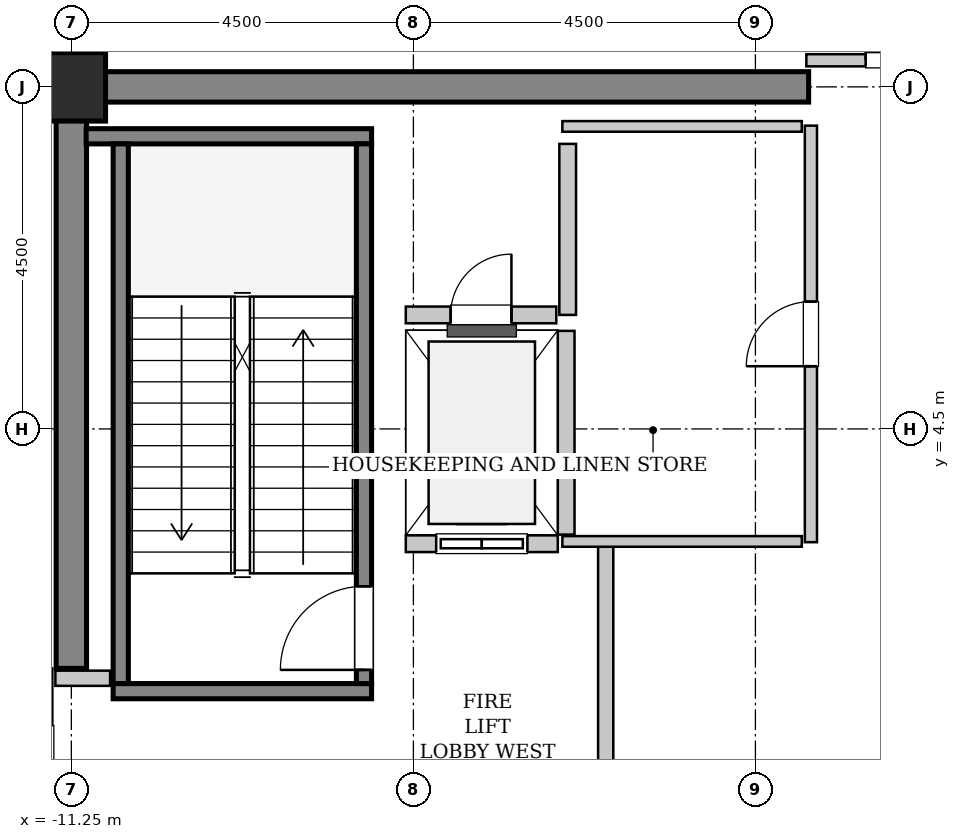
"""IFC4 building model, lengths in metres.
Left out: names, types, materials, properties, quantities, classifications, styles, units other than length and angle.
Written with IfcOpenShell. Run it as: python <this file> out.ifc"""

import sys

from ifc_helpers import new_model, si_unit, direction, frame, frame_2d, origin, origin_2d, place, context, subcontext, project, spatial, rectangle, extrude, source, transform, mapped, element, fill, save


model = new_model("IFC4")
c1 = context("Model", 3, precision=1e-05, world=origin(), true_north=direction((0.0, 1.0)))
c2 = subcontext(c1, "Body", "Model", "MODEL_VIEW")
j1 = project(units=[si_unit("LENGTHUNIT", "METRE"), si_unit("PLANEANGLEUNIT", "RADIAN")], contexts=[c1])
p1 = place(None, origin())
s1 = spatial("IfcSite", under=j1, at=p1, CompositionType="ELEMENT")
p2 = place(p1, origin())
s2 = spatial("IfcBuilding", under=s1, at=p2, CompositionType="ELEMENT")
p3 = place(p2, frame((0.0, 0.0, 353.8)))
s3 = spatial("IfcBuildingStorey", under=s2, at=p3, CompositionType="ELEMENT", Elevation=353.8)
m1 = source(origin(), c2, "Body", "SweptSolid", [
    extrude(rectangle(XDim=9.9, YDim=0.4, at=frame_2d((4.95, 0.0))), origin(), (0.0, 0.0, 1.0), 4.8),
])
p4 = place(p3, frame((-11.45, 9.0, 0.0), z_axis=(0.0, 0.0, 1.0), x_axis=(1.0, 0.0, 0.0)))
e1 = element("IfcWall", 1, at=p4, inside=s3, PredefinedType="SHEAR", context=c2, shape_type="MappedRepresentation", body=[
    mapped(m1, transform((0.0, 0.0, 0.0), x_axis=(1.0, 0.0, 0.0), y_axis=(0.0, 1.0, 0.0), z_axis=(0.0, 0.0, 1.0), scale=1.0)),
])
m2 = source(origin(), c2, "Body", "SweptSolid", [
    extrude(rectangle(XDim=7.45, YDim=0.4, at=frame_2d((3.725, 0.0))), origin(), (0.0, 0.0, 1.0), 4.8),
])
p5 = place(p3, frame((-11.25, 1.35, 0.0), z_axis=(0.0, 0.0, 1.0), x_axis=(0.0, 1.0, 0.0)))
e2 = element("IfcWall", 2, at=p5, inside=s3, PredefinedType="SHEAR", context=c2, shape_type="MappedRepresentation", body=[
    mapped(m2, transform((0.0, 0.0, 0.0), x_axis=(1.0, 0.0, 0.0), y_axis=(0.0, 1.0, 0.0), z_axis=(0.0, 0.0, 1.0), scale=1.0)),
])
m3 = source(origin(), c2, "Body", "SweptSolid", [
    extrude(rectangle(XDim=0.9, YDim=0.9, at=origin_2d()), origin(), (0.0, 0.0, 1.0), 4.8),
])
p6 = place(p3, frame((-11.25, 9.0, 0.0), z_axis=(0.0, 0.0, 1.0), x_axis=(1.0, 0.0, 0.0)))
e3 = element("IfcColumn", 3, at=p6, inside=s3, PredefinedType="COLUMN", context=c2, shape_type="MappedRepresentation", body=[
    mapped(m3, transform((0.0, 0.0, 0.0), x_axis=(1.0, 0.0, 0.0), y_axis=(0.0, 1.0, 0.0), z_axis=(0.0, 0.0, 1.0), scale=1.0)),
])
m4 = source(origin(), c2, "Body", "SweptSolid", [
    extrude(rectangle(XDim=3.4, YDim=0.2, at=frame_2d((1.7, 0.0))), origin(), (0.0, 0.0, 1.0), 4.8),
])
p7 = place(p3, frame((-7.3, 1.05, 0.0), z_axis=(0.0, 0.0, 1.0), x_axis=(-1.0, 0.0, 0.0)))
e4 = element("IfcWall", 4, at=p7, inside=s3, PredefinedType="SOLIDWALL", context=c2, shape_type="MappedRepresentation", body=[
    mapped(m4, transform((0.0, 0.0, 0.0), x_axis=(1.0, 0.0, 0.0), y_axis=(0.0, 1.0, 0.0), z_axis=(0.0, 0.0, 1.0), scale=1.0)),
])
m5 = source(origin(), c2, "Body", "SweptSolid", [
    extrude(rectangle(XDim=3.755, YDim=0.2, at=frame_2d((1.877, 0.0))), origin(), (0.0, 0.0, 1.0), 4.8),
])
p8 = place(p3, frame((-7.3, 8.35, 0.0), z_axis=(0.0, 0.0, 1.0), x_axis=(-1.0, 0.0, 0.0)))
e5 = element("IfcWall", 5, at=p8, inside=s3, PredefinedType="SOLIDWALL", context=c2, shape_type="MappedRepresentation", body=[
    mapped(m5, transform((0.0, 0.0, 0.0), x_axis=(1.0, 0.0, 0.0), y_axis=(0.0, 1.0, 0.0), z_axis=(0.0, 0.0, 1.0), scale=1.0)),
])
m6 = source(origin(), c2, "Body", "SweptSolid", [
    extrude(rectangle(XDim=7.1, YDim=0.2, at=frame_2d((3.55, 0.0))), origin(), (0.0, 0.0, 1.0), 4.8),
])
p9 = place(p3, frame((-7.4, 1.15, 0.0), z_axis=(0.0, 0.0, 1.0), x_axis=(0.0, 1.0, 0.0)))
e6 = element("IfcWall", 6, at=p9, inside=s3, PredefinedType="SOLIDWALL", context=c2, shape_type="MappedRepresentation", body=[
    mapped(m6, transform((0.0, 0.0, 0.0), x_axis=(1.0, 0.0, 0.0), y_axis=(0.0, 1.0, 0.0), z_axis=(0.0, 0.0, 1.0), scale=1.0)),
])
p10 = place(p9, frame((0.18, 0.0, 0.0)))
e7 = element("IfcOpeningElement", 7, at=p10, cuts=e6, PredefinedType="OPENING", context=c2, shape_type="SweptSolid", body=[
    extrude(rectangle(XDim=1.1, YDim=2.15, at=frame_2d((0.55, 1.075))), frame((0.0, 0.11, 0.0), z_axis=(0.0, -1.0, 0.0), x_axis=(1.0, 0.0, 0.0)), (0.0, 0.0, 1.0), 0.22),
])
p11 = place(p3, frame((-10.6, 1.15, 0.0), z_axis=(0.0, 0.0, 1.0), x_axis=(0.0, 1.0, 0.0)))
e8 = element("IfcWall", 8, at=p11, inside=s3, PredefinedType="SOLIDWALL", context=c2, shape_type="MappedRepresentation", body=[
    mapped(m6, transform((0.0, 0.0, 0.0), x_axis=(1.0, 0.0, 0.0), y_axis=(0.0, 1.0, 0.0), z_axis=(0.0, 0.0, 1.0), scale=1.0)),
])
m7 = source(origin(), c2, "Body", "SweptSolid", [
    extrude(rectangle(XDim=2.0, YDim=0.22, at=frame_2d((1.0, 0.0))), origin(), (0.0, 0.0, 1.0), 4.485),
])
p12 = place(p3, frame((-6.85, 2.99, 0.0), z_axis=(0.0, 0.0, 1.0), x_axis=(1.0, 0.0, 0.0)))
e9 = element("IfcWall", 9, at=p12, inside=s3, PredefinedType="SOLIDWALL", context=c2, shape_type="MappedRepresentation", body=[
    mapped(m7, transform((0.0, 0.0, 0.0), x_axis=(1.0, 0.0, 0.0), y_axis=(0.0, 1.0, 0.0), z_axis=(0.0, 0.0, 1.0), scale=1.0)),
])
p13 = place(p12, frame((0.4, 0.0, 0.0)))
e10 = element("IfcOpeningElement", 10, at=p13, cuts=e9, PredefinedType="OPENING", context=c2, shape_type="SweptSolid", body=[
    extrude(rectangle(XDim=1.2, YDim=2.2, at=frame_2d((0.6, 1.1))), frame((0.0, 0.12, 0.0), z_axis=(0.0, -1.0, 0.0), x_axis=(1.0, 0.0, 0.0)), (0.0, 0.0, 1.0), 0.24),
])
m8 = source(origin(), c2, "Body", "SweptSolid", [
    extrude(rectangle(XDim=2.68, YDim=0.22, at=frame_2d((1.34, 0.0))), origin(), (0.0, 0.0, 1.0), 4.485),
])
p14 = place(p3, frame((-4.74, 3.11, 0.0), z_axis=(0.0, 0.0, 1.0), x_axis=(0.0, 1.0, 0.0)))
e11 = element("IfcWall", 11, at=p14, inside=s3, PredefinedType="SOLIDWALL", context=c2, shape_type="MappedRepresentation", body=[
    mapped(m8, transform((0.0, 0.0, 0.0), x_axis=(1.0, 0.0, 0.0), y_axis=(0.0, 1.0, 0.0), z_axis=(0.0, 0.0, 1.0), scale=1.0)),
])
m9 = source(origin(), c2, "Body", "SweptSolid", [
    extrude(rectangle(XDim=2.25, YDim=0.22, at=frame_2d((1.125, 0.0))), origin(), (0.0, 0.0, 1.0), 4.485),
])
p15 = place(p3, frame((-4.72, 6.0, 0.0), z_axis=(0.0, 0.0, 1.0), x_axis=(0.0, 1.0, 0.0)))
e12 = element("IfcWall", 12, at=p15, inside=s3, PredefinedType="SOLIDWALL", context=c2, shape_type="MappedRepresentation", body=[
    mapped(m9, transform((0.0, 0.0, 0.0), x_axis=(1.0, 0.0, 0.0), y_axis=(0.0, 1.0, 0.0), z_axis=(0.0, 0.0, 1.0), scale=1.0)),
])
m10 = source(origin(), c2, "Body", "SweptSolid", [
    extrude(rectangle(XDim=1.98, YDim=0.22, at=frame_2d((0.99, 0.0))), origin(), (0.0, 0.0, 1.0), 4.485),
])
p16 = place(p3, frame((-6.85, 6.0, 0.0), z_axis=(0.0, 0.0, 1.0), x_axis=(1.0, 0.0, 0.0)))
e13 = element("IfcWall", 13, at=p16, inside=s3, PredefinedType="SOLIDWALL", context=c2, shape_type="MappedRepresentation", body=[
    mapped(m10, transform((0.0, 0.0, 0.0), x_axis=(1.0, 0.0, 0.0), y_axis=(0.0, 1.0, 0.0), z_axis=(0.0, 0.0, 1.0), scale=1.0)),
])
p17 = place(p16, frame((0.59, 0.0, 0.0)))
e14 = element("IfcOpeningElement", 14, at=p17, cuts=e13, PredefinedType="OPENING", context=c2, shape_type="SweptSolid", body=[
    extrude(rectangle(XDim=0.8, YDim=2.0, at=frame_2d((0.4, 1.0))), frame((0.0, 0.12, 0.0), z_axis=(0.0, -1.0, 0.0), x_axis=(1.0, 0.0, 0.0)), (0.0, 0.0, 1.0), 0.24),
])
m11 = source(origin(), c2, "Body", "SweptSolid", [
    extrude(rectangle(XDim=5.9, YDim=0.2, at=frame_2d((2.95, 0.0))), origin(), (0.0, 0.0, 1.0), 4.485),
])
p18 = place(p3, frame((-4.22, -2.95, 0.0), z_axis=(0.0, 0.0, 1.0), x_axis=(0.0, 1.0, 0.0)))
e15 = element("IfcWall", 15, at=p18, inside=s3, PredefinedType="PARTITIONING", context=c2, shape_type="MappedRepresentation", body=[
    mapped(m11, transform((0.0, 0.0, 0.0), x_axis=(1.0, 0.0, 0.0), y_axis=(0.0, 1.0, 0.0), z_axis=(0.0, 0.0, 1.0), scale=1.0)),
])
m12 = source(origin(), c2, "Body", "SweptSolid", [
    extrude(rectangle(XDim=0.72, YDim=0.2, at=frame_2d((0.36, 0.0))), origin(), (0.0, 0.0, 1.0), 4.485),
])
p19 = place(p3, frame((-11.46, 1.22, 0.0), z_axis=(0.0, 0.0, 1.0), x_axis=(1.0, 0.0, 0.0)))
e16 = element("IfcWall", 16, at=p19, inside=s3, PredefinedType="PARTITIONING", context=c2, shape_type="MappedRepresentation", body=[
    mapped(m12, transform((0.0, 0.0, 0.0), x_axis=(1.0, 0.0, 0.0), y_axis=(0.0, 1.0, 0.0), z_axis=(0.0, 0.0, 1.0), scale=1.0)),
])
m13 = source(origin(), c2, "Body", "SweptSolid", [
    extrude(rectangle(XDim=3.16, YDim=0.16, at=frame_2d((1.58, 0.0))), origin(), (0.0, 0.0, 1.0), 3.575),
])
p20 = place(p3, frame((-1.58, 9.35, 0.0), z_axis=(0.0, 0.0, 1.0), x_axis=(1.0, 0.0, 0.0)))
e17 = element("IfcWall", 17, at=p20, inside=s3, PredefinedType="PARTITIONING", context=c2, shape_type="MappedRepresentation", body=[
    mapped(m13, transform((0.0, 0.0, 0.0), x_axis=(1.0, 0.0, 0.0), y_axis=(0.0, 1.0, 0.0), z_axis=(0.0, 0.0, 1.0), scale=1.0)),
])
p21 = place(p20, frame((0.78, 0.0, 0.0)))
e18 = element("IfcOpeningElement", 18, at=p21, cuts=e17, PredefinedType="OPENING", context=c2, shape_type="SweptSolid", body=[
    extrude(rectangle(XDim=1.6, YDim=2.3, at=frame_2d((0.8, 1.15))), frame((0.0, 0.09, 0.0), z_axis=(0.0, -1.0, 0.0), x_axis=(1.0, 0.0, 0.0)), (0.0, 0.0, 1.0), 0.18),
])
m14 = source(origin(), c2, "Body", "SweptSolid", [
    extrude(rectangle(XDim=5.48, YDim=0.16, at=frame_2d((2.74, 0.0))), origin(), (0.0, 0.0, 1.0), 4.485),
])
p22 = place(p3, frame((-1.52, 3.01, 0.0), z_axis=(0.0, 0.0, 1.0), x_axis=(0.0, 1.0, 0.0)))
e19 = element("IfcWall", 19, at=p22, inside=s3, PredefinedType="PARTITIONING", context=c2, shape_type="MappedRepresentation", body=[
    mapped(m14, transform((0.0, 0.0, 0.0), x_axis=(1.0, 0.0, 0.0), y_axis=(0.0, 1.0, 0.0), z_axis=(0.0, 0.0, 1.0), scale=1.0)),
])
p23 = place(p22, frame((2.315, 0.0, 0.0)))
e20 = element("IfcOpeningElement", 20, at=p23, cuts=e19, PredefinedType="OPENING", context=c2, shape_type="SweptSolid", body=[
    extrude(rectangle(XDim=0.85, YDim=2.1, at=frame_2d((0.425, 1.05))), frame((0.0, 0.09, 0.0), z_axis=(0.0, -1.0, 0.0), x_axis=(1.0, 0.0, 0.0)), (0.0, 0.0, 1.0), 0.18),
])
m15 = source(origin(), c2, "Body", "SweptSolid", [
    extrude(rectangle(XDim=3.15, YDim=0.14, at=frame_2d((1.575, 0.0))), origin(), (0.0, 0.0, 1.0), 4.485),
])
for number, where, z_axis, x_axis in (
    (21, (-4.79, 3.02, 0.0), (0.0, 0.0, 1.0), (1.0, 0.0, 0.0)),
    (22, (-4.79, 8.48, 0.0), (0.0, 0.0, 1.0), (1.0, 0.0, 0.0)),
):
    element("IfcWall", number, at=place(p3, frame(where, z_axis=z_axis, x_axis=x_axis)), inside=s3, PredefinedType="PARTITIONING", context=c2, shape_type="MappedRepresentation", body=[
        mapped(m15, transform((0.0, 0.0, 0.0), x_axis=(1.0, 0.0, 0.0), y_axis=(0.0, 1.0, 0.0), z_axis=(0.0, 0.0, 1.0), scale=1.0)),
    ])
m16 = source(origin(), c2, "Body", "SweptSolid", [
    extrude(rectangle(XDim=1.1, YDim=2.15, at=frame_2d((0.55, 1.075))), frame((0.0, 0.025, 0.0), z_axis=(0.0, -1.0, 0.0), x_axis=(1.0, 0.0, 0.0)), (0.0, 0.0, 1.0), 0.05),
])
p24 = place(p10, origin())
e23 = element("IfcDoor", 23, at=p24, inside=s3, OperationType="SINGLE_SWING_LEFT", PredefinedType="DOOR", context=c2, shape_type="MappedRepresentation", body=[
    mapped(m16, transform((0.0, 0.0, 0.0), x_axis=(1.0, 0.0, 0.0), y_axis=(0.0, 1.0, 0.0), z_axis=(0.0, 0.0, 1.0), scale=1.0)),
])
fill(e7, e23)
m17 = source(origin(), c2, "Body", "SweptSolid", [
    extrude(rectangle(XDim=1.2, YDim=2.2, at=frame_2d((0.6, 1.1))), frame((0.0, 0.025, 0.0), z_axis=(0.0, -1.0, 0.0), x_axis=(1.0, 0.0, 0.0)), (0.0, 0.0, 1.0), 0.05),
])
p25 = place(p13, origin())
e24 = element("IfcDoor", 24, at=p25, inside=s3, OperationType="SLIDING_TO_LEFT", PredefinedType="DOOR", context=c2, shape_type="MappedRepresentation", body=[
    mapped(m17, transform((0.0, 0.0, 0.0), x_axis=(1.0, 0.0, 0.0), y_axis=(0.0, 1.0, 0.0), z_axis=(0.0, 0.0, 1.0), scale=1.0)),
])
fill(e10, e24)
m18 = source(origin(), c2, "Body", "SweptSolid", [
    extrude(rectangle(XDim=0.8, YDim=2.0, at=frame_2d((0.4, 1.0))), frame((0.0, 0.025, 0.0), z_axis=(0.0, -1.0, 0.0), x_axis=(1.0, 0.0, 0.0)), (0.0, 0.0, 1.0), 0.05),
])
p26 = place(p17, origin())
e25 = element("IfcDoor", 25, at=p26, inside=s3, OperationType="SINGLE_SWING_RIGHT", PredefinedType="TRAPDOOR", context=c2, shape_type="MappedRepresentation", body=[
    mapped(m18, transform((0.0, 0.0, 0.0), x_axis=(1.0, 0.0, 0.0), y_axis=(0.0, 1.0, 0.0), z_axis=(0.0, 0.0, 1.0), scale=1.0)),
])
fill(e14, e25)
m19 = source(origin(), c2, "Body", "SweptSolid", [
    extrude(rectangle(XDim=1.6, YDim=2.3, at=frame_2d((0.8, 1.15))), frame((0.0, 0.025, 0.0), z_axis=(0.0, -1.0, 0.0), x_axis=(1.0, 0.0, 0.0)), (0.0, 0.0, 1.0), 0.05),
])
p27 = place(p21, origin())
e26 = element("IfcDoor", 26, at=p27, inside=s3, OperationType="DOUBLE_DOOR_SINGLE_SWING", PredefinedType="DOOR", context=c2, shape_type="MappedRepresentation", body=[
    mapped(m19, transform((0.0, 0.0, 0.0), x_axis=(1.0, 0.0, 0.0), y_axis=(0.0, 1.0, 0.0), z_axis=(0.0, 0.0, 1.0), scale=1.0)),
])
fill(e18, e26)
m20 = source(origin(), c2, "Body", "SweptSolid", [
    extrude(rectangle(XDim=0.85, YDim=2.1, at=frame_2d((0.425, 1.05))), frame((0.0, 0.025, 0.0), z_axis=(0.0, -1.0, 0.0), x_axis=(1.0, 0.0, 0.0)), (0.0, 0.0, 1.0), 0.05),
])
p28 = place(p23, origin())
e27 = element("IfcDoor", 27, at=p28, inside=s3, OperationType="SINGLE_SWING_LEFT", PredefinedType="DOOR", context=c2, shape_type="MappedRepresentation", body=[
    mapped(m20, transform((0.0, 0.0, 0.0), x_axis=(1.0, 0.0, 0.0), y_axis=(0.0, 1.0, 0.0), z_axis=(0.0, 0.0, 1.0), scale=1.0)),
])
fill(e20, e27)
save(model, sys.argv[1])
